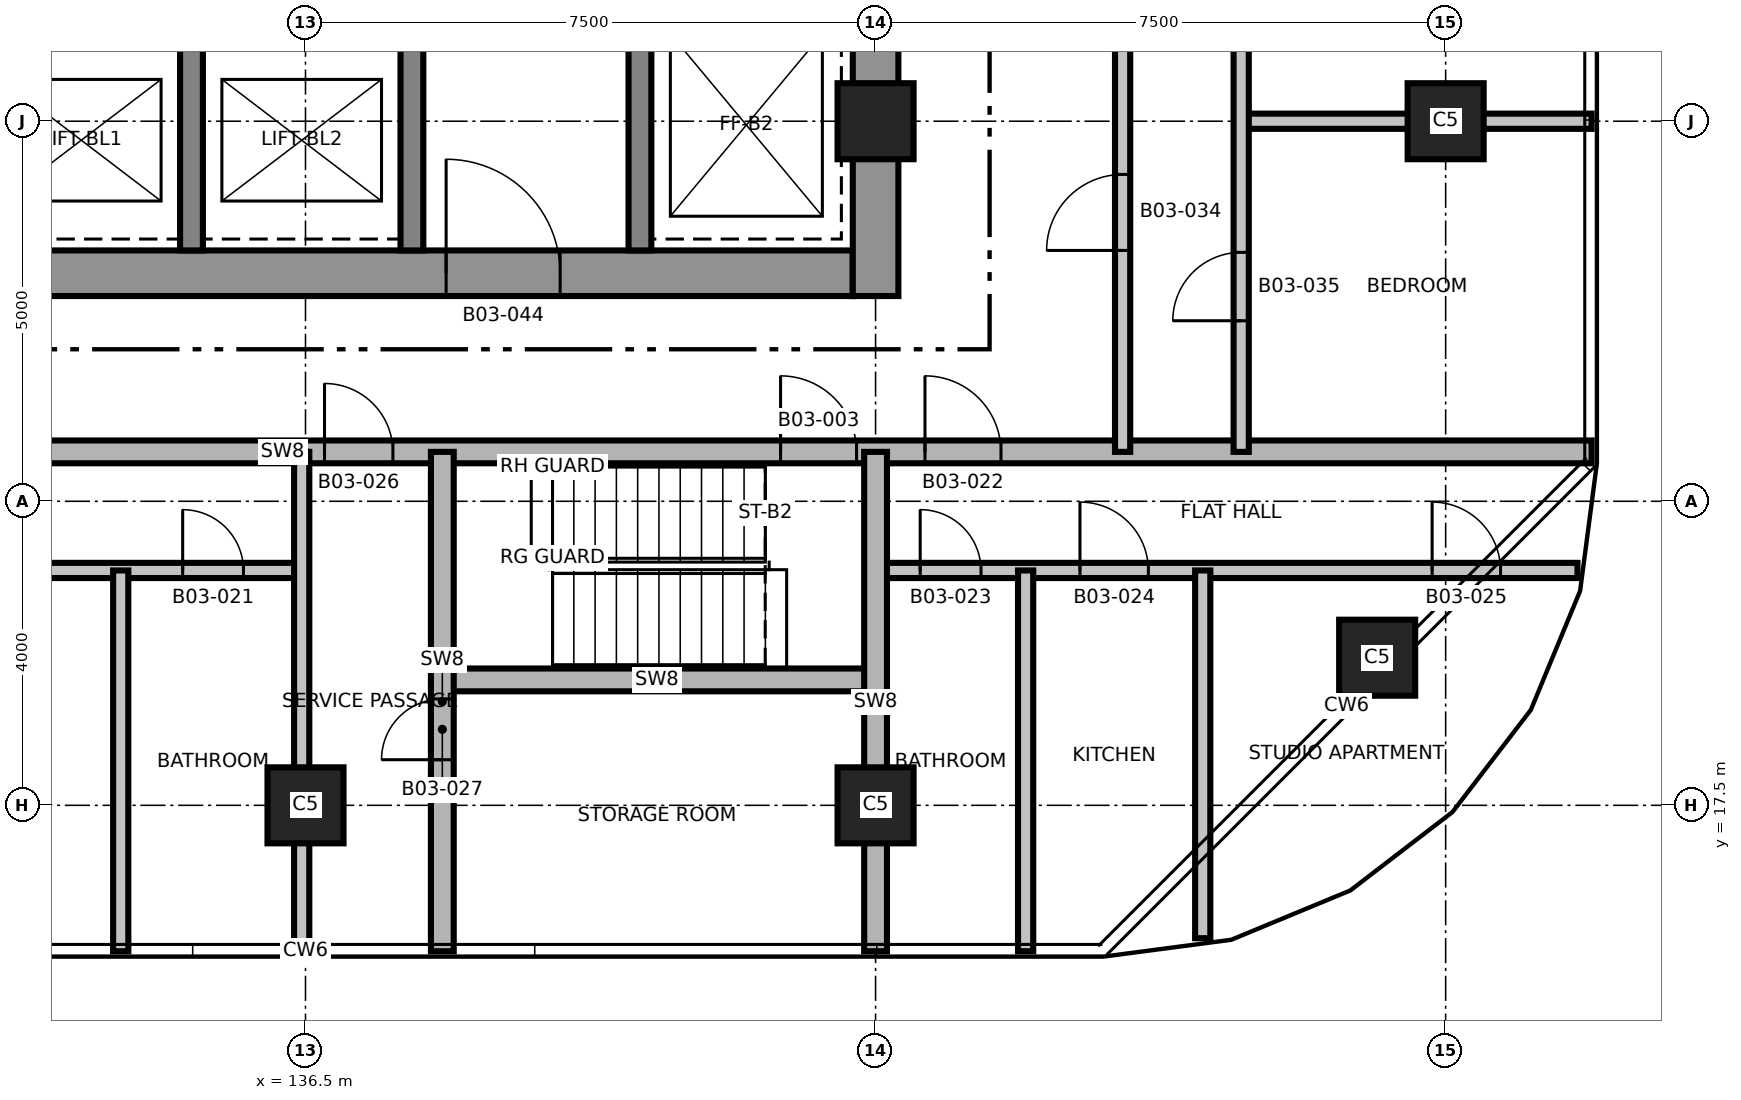
"""IFC4 building model, lengths in metres.
Left out: names, types, materials, properties, quantities, classifications, styles, units other than length and angle.
Written with IfcOpenShell. Run it as: python <this file> out.ifc"""

import sys

from ifc_helpers import new_model, si_unit, direction, frame, frame_2d, origin, origin_2d, place, context, subcontext, project, spatial, rectangle, extrude, element, fill, save


model = new_model("IFC4")
c1 = context("Model", 3, precision=1e-05, world=origin(), true_north=direction((0.0, 1.0)))
c2 = subcontext(c1, "Body", "Model", "MODEL_VIEW")
j1 = project(units=[si_unit("LENGTHUNIT", "METRE"), si_unit("PLANEANGLEUNIT", "RADIAN")], contexts=[c1])
p1 = place(None, origin())
s1 = spatial("IfcSite", under=j1, at=p1, CompositionType="ELEMENT")
p2 = place(p1, origin())
s2 = spatial("IfcBuilding", under=s1, at=p2, CompositionType="ELEMENT")
p3 = place(p2, frame((0.0, 0.0, 52.0)))
s3 = spatial("IfcBuildingStorey", under=s2, at=p3, CompositionType="ELEMENT", Elevation=52.0)
p4 = place(p3, frame((128.7, 24.5, 0.0), z_axis=(0.0, 0.0, 1.0), x_axis=(1.0, 0.0, 0.0)))
e1 = element("IfcWall", 1, at=p4, inside=s3, PredefinedType="SHEAR", context=c2, shape_type="SweptSolid", body=[
    extrude(rectangle(XDim=15.0, YDim=0.6, at=frame_2d((7.5, 0.0))), origin(), (0.0, 0.0, 1.0), 3.7),
])
p5 = place(p4, frame((9.65, 0.0, 0.0)))
e2 = element("IfcOpeningElement", 2, at=p5, cuts=e1, PredefinedType="OPENING", context=c2, shape_type="SweptSolid", body=[
    extrude(rectangle(XDim=1.5, YDim=2.1, at=frame_2d((0.75, 1.05))), frame((0.0, 0.31, 0.0), z_axis=(0.0, -1.0, 0.0), x_axis=(1.0, 0.0, 0.0)), (0.0, 0.0, 1.0), 0.62),
])
p6 = place(p4, frame((1.25, 0.0, 0.0)))
e3 = element("IfcOpeningElement", 3, at=p6, cuts=e1, PredefinedType="OPENING", context=c2, shape_type="SweptSolid", body=[
    extrude(rectangle(XDim=0.9, YDim=2.1, at=frame_2d((0.45, 1.05))), frame((0.0, 0.31, 0.0), z_axis=(0.0, -1.0, 0.0), x_axis=(1.0, 0.0, 0.0)), (0.0, 0.0, 1.0), 0.62),
])
p7 = place(p3, frame((144.0, 24.2, 0.0), z_axis=(0.0, 0.0, 1.0), x_axis=(0.0, 1.0, 0.0)))
e4 = element("IfcWall", 4, at=p7, inside=s3, PredefinedType="SHEAR", context=c2, shape_type="SweptSolid", body=[
    extrude(rectangle(XDim=13.6, YDim=0.6, at=frame_2d((6.8, 0.0))), origin(), (0.0, 0.0, 1.0), 3.7),
])
p8 = place(p3, frame((137.9, 24.8, 0.0), z_axis=(0.0, 0.0, 1.0), x_axis=(0.0, 1.0, 0.0)))
e5 = element("IfcWall", 5, at=p8, inside=s3, PredefinedType="SHEAR", context=c2, shape_type="SweptSolid", body=[
    extrude(rectangle(XDim=12.4, YDim=0.3, at=frame_2d((6.2, 0.0))), origin(), (0.0, 0.0, 1.0), 3.7),
])
p9 = place(p8, frame((3.95, 0.0, 0.0)))
e6 = element("IfcOpeningElement", 6, at=p9, cuts=e5, PredefinedType="OPENING", context=c2, shape_type="SweptSolid", body=[
    extrude(rectangle(XDim=1.5, YDim=2.1, at=frame_2d((0.75, 1.05))), frame((0.0, 0.16, 0.0), z_axis=(0.0, -1.0, 0.0), x_axis=(1.0, 0.0, 0.0)), (0.0, 0.0, 1.0), 0.32),
])
p10 = place(p8, frame((10.45, 0.0, 0.0)))
e7 = element("IfcOpeningElement", 7, at=p10, cuts=e5, PredefinedType="OPENING", context=c2, shape_type="SweptSolid", body=[
    extrude(rectangle(XDim=0.9, YDim=2.1, at=frame_2d((0.45, 1.05))), frame((0.0, 0.16, 0.0), z_axis=(0.0, -1.0, 0.0), x_axis=(1.0, 0.0, 0.0)), (0.0, 0.0, 1.0), 0.32),
])
p11 = place(p3, frame((140.9, 24.8, 0.0), z_axis=(0.0, 0.0, 1.0), x_axis=(0.0, 1.0, 0.0)))
e8 = element("IfcWall", 8, at=p11, inside=s3, PredefinedType="SHEAR", context=c2, shape_type="SweptSolid", body=[
    extrude(rectangle(XDim=12.4, YDim=0.3, at=frame_2d((6.2, 0.0))), origin(), (0.0, 0.0, 1.0), 3.7),
])
p12 = place(p11, frame((5.9, 0.0, 0.0)))
e9 = element("IfcOpeningElement", 9, at=p12, cuts=e8, PredefinedType="OPENING", context=c2, shape_type="SweptSolid", body=[
    extrude(rectangle(XDim=1.2, YDim=2.1, at=frame_2d((0.6, 1.05))), frame((0.0, 0.16, 0.0), z_axis=(0.0, -1.0, 0.0), x_axis=(1.0, 0.0, 0.0)), (0.0, 0.0, 1.0), 0.32),
])
p13 = place(p3, frame((135.0, 24.8, 0.0), z_axis=(0.0, 0.0, 1.0), x_axis=(0.0, 1.0, 0.0)))
e10 = element("IfcWall", 10, at=p13, inside=s3, PredefinedType="SHEAR", context=c2, shape_type="SweptSolid", body=[
    extrude(rectangle(XDim=2.75, YDim=0.3, at=frame_2d((1.375, 0.0))), origin(), (0.0, 0.0, 1.0), 3.7),
])
for number, where, z_axis, x_axis in (
    (11, (136.5, 17.5, 0.0), (0.0, 0.0, 1.0), (1.0, 0.0, 0.0)),
    (12, (144.0, 17.5, 0.0), (0.0, 0.0, 1.0), (1.0, 0.0, 0.0)),
    (13, (150.599, 19.442, 0.0), (0.0, 0.0, 1.0), (1.0, 0.0, 0.0)),
    (14, (144.0, 26.5, 0.0), (0.0, 0.0, 1.0), (1.0, 0.0, 0.0)),
    (15, (151.5, 26.5, 0.0), (0.0, 0.0, 1.0), (1.0, 0.0, 0.0)),
):
    element("IfcColumn", number, at=place(p3, frame(where, z_axis=z_axis, x_axis=x_axis)), inside=s3, PredefinedType="COLUMN", context=c2, shape_type="SweptSolid", body=[
        extrude(rectangle(XDim=1.0, YDim=1.0, at=origin_2d()), origin(), (0.0, 0.0, 1.0), 3.7),
    ])
p14 = place(p3, frame((138.25, 19.15, 0.0), z_axis=(0.0, 0.0, 1.0), x_axis=(1.0, 0.0, 0.0)))
e16 = element("IfcWall", 16, at=p14, inside=s3, PredefinedType="SHEAR", context=c2, shape_type="SweptSolid", body=[
    extrude(rectangle(XDim=5.75, YDim=0.3, at=frame_2d((2.875, 0.0))), origin(), (0.0, 0.0, 1.0), 3.4),
])
p15 = place(p3, frame((119.766, 20.59, 0.0), z_axis=(0.0, 0.0, 1.0), x_axis=(1.0, 0.0, 0.0)))
e17 = element("IfcWall", 17, at=p15, inside=s3, PredefinedType="PARTITIONING", context=c2, shape_type="SweptSolid", body=[
    extrude(rectangle(XDim=16.734, YDim=0.2, at=frame_2d((8.367, 0.0))), origin(), (0.0, 0.0, 1.0), 3.4),
])
p16 = place(p15, frame((3.282, 0.0, 0.0)))
e18 = element("IfcOpeningElement", 18, at=p16, cuts=e17, PredefinedType="OPENING", context=c2, shape_type="SweptSolid", body=[
    extrude(rectangle(XDim=0.9, YDim=2.1, at=frame_2d((0.45, 1.05))), frame((0.0, 0.11, 0.0), z_axis=(0.0, -1.0, 0.0), x_axis=(1.0, 0.0, 0.0)), (0.0, 0.0, 1.0), 0.22),
])
p17 = place(p15, frame((7.152, 0.0, 0.0)))
e19 = element("IfcOpeningElement", 19, at=p17, cuts=e17, PredefinedType="OPENING", context=c2, shape_type="SweptSolid", body=[
    extrude(rectangle(XDim=0.9, YDim=2.1, at=frame_2d((0.45, 1.05))), frame((0.0, 0.11, 0.0), z_axis=(0.0, -1.0, 0.0), x_axis=(1.0, 0.0, 0.0)), (0.0, 0.0, 1.0), 0.22),
])
p18 = place(p15, frame((11.318, 0.0, 0.0)))
e20 = element("IfcOpeningElement", 20, at=p18, cuts=e17, PredefinedType="OPENING", context=c2, shape_type="SweptSolid", body=[
    extrude(rectangle(XDim=0.9, YDim=2.1, at=frame_2d((0.45, 1.05))), frame((0.0, 0.11, 0.0), z_axis=(0.0, -1.0, 0.0), x_axis=(1.0, 0.0, 0.0)), (0.0, 0.0, 1.0), 0.22),
])
p19 = place(p15, frame((15.118, 0.0, 0.0)))
e21 = element("IfcOpeningElement", 21, at=p19, cuts=e17, PredefinedType="OPENING", context=c2, shape_type="SweptSolid", body=[
    extrude(rectangle(XDim=0.8, YDim=2.1, at=frame_2d((0.4, 1.05))), frame((0.0, 0.11, 0.0), z_axis=(0.0, -1.0, 0.0), x_axis=(1.0, 0.0, 0.0)), (0.0, 0.0, 1.0), 0.22),
])
p20 = place(p3, frame((144.0, 20.59, 0.0), z_axis=(0.0, 0.0, 1.0), x_axis=(1.0, 0.0, 0.0)))
e22 = element("IfcWall", 22, at=p20, inside=s3, PredefinedType="PARTITIONING", context=c2, shape_type="SweptSolid", body=[
    extrude(rectangle(XDim=9.234, YDim=0.2, at=frame_2d((4.617, 0.0))), origin(), (0.0, 0.0, 1.0), 3.4),
])
p21 = place(p20, frame((0.587, 0.0, 0.0)))
e23 = element("IfcOpeningElement", 23, at=p21, cuts=e22, PredefinedType="OPENING", context=c2, shape_type="SweptSolid", body=[
    extrude(rectangle(XDim=0.8, YDim=2.1, at=frame_2d((0.4, 1.05))), frame((0.0, 0.11, 0.0), z_axis=(0.0, -1.0, 0.0), x_axis=(1.0, 0.0, 0.0)), (0.0, 0.0, 1.0), 0.22),
])
p22 = place(p20, frame((2.689, 0.0, 0.0)))
e24 = element("IfcOpeningElement", 24, at=p22, cuts=e22, PredefinedType="OPENING", context=c2, shape_type="SweptSolid", body=[
    extrude(rectangle(XDim=0.9, YDim=2.1, at=frame_2d((0.45, 1.05))), frame((0.0, 0.11, 0.0), z_axis=(0.0, -1.0, 0.0), x_axis=(1.0, 0.0, 0.0)), (0.0, 0.0, 1.0), 0.22),
])
p23 = place(p20, frame((7.322, 0.0, 0.0)))
e25 = element("IfcOpeningElement", 25, at=p23, cuts=e22, PredefinedType="OPENING", context=c2, shape_type="SweptSolid", body=[
    extrude(rectangle(XDim=0.9, YDim=2.1, at=frame_2d((0.45, 1.05))), frame((0.0, 0.11, 0.0), z_axis=(0.0, -1.0, 0.0), x_axis=(1.0, 0.0, 0.0)), (0.0, 0.0, 1.0), 0.22),
])
p24 = place(p3, frame((119.58, 22.15, 0.0), z_axis=(0.0, 0.0, 1.0), x_axis=(1.0, 0.0, 0.0)))
e26 = element("IfcWall", 26, at=p24, inside=s3, PredefinedType="SHEAR", context=c2, shape_type="SweptSolid", body=[
    extrude(rectangle(XDim=33.84, YDim=0.3, at=frame_2d((16.92, 0.0))), origin(), (0.0, 0.0, 1.0), 3.4),
])
p25 = place(p24, frame((23.17, 0.0, 0.0)))
e27 = element("IfcOpeningElement", 27, at=p25, cuts=e26, PredefinedType="OPENING", context=c2, shape_type="SweptSolid", body=[
    extrude(rectangle(XDim=1.0, YDim=2.1, at=frame_2d((0.5, 1.05))), frame((0.0, 0.16, 0.0), z_axis=(0.0, -1.0, 0.0), x_axis=(1.0, 0.0, 0.0)), (0.0, 0.0, 1.0), 0.32),
])
p26 = place(p24, frame((11.52, 0.0, 0.0)))
e28 = element("IfcOpeningElement", 28, at=p26, cuts=e26, PredefinedType="OPENING", context=c2, shape_type="SweptSolid", body=[
    extrude(rectangle(XDim=1.0, YDim=2.1, at=frame_2d((0.5, 1.05))), frame((0.0, 0.16, 0.0), z_axis=(0.0, -1.0, 0.0), x_axis=(1.0, 0.0, 0.0)), (0.0, 0.0, 1.0), 0.32),
])
p27 = place(p24, frame((25.07, 0.0, 0.0)))
e29 = element("IfcOpeningElement", 29, at=p27, cuts=e26, PredefinedType="OPENING", context=c2, shape_type="SweptSolid", body=[
    extrude(rectangle(XDim=1.0, YDim=2.1, at=frame_2d((0.5, 1.05))), frame((0.0, 0.16, 0.0), z_axis=(0.0, -1.0, 0.0), x_axis=(1.0, 0.0, 0.0)), (0.0, 0.0, 1.0), 0.32),
])
p28 = place(p24, frame((17.17, 0.0, 0.0)))
e30 = element("IfcOpeningElement", 30, at=p28, cuts=e26, PredefinedType="OPENING", context=c2, shape_type="SweptSolid", body=[
    extrude(rectangle(XDim=0.9, YDim=2.1, at=frame_2d((0.45, 1.05))), frame((0.0, 0.16, 0.0), z_axis=(0.0, -1.0, 0.0), x_axis=(1.0, 0.0, 0.0)), (0.0, 0.0, 1.0), 0.32),
])
p29 = place(p3, frame((148.81, 26.5, 0.0), z_axis=(0.0, 0.0, 1.0), x_axis=(1.0, 0.0, 0.0)))
e31 = element("IfcWall", 31, at=p29, inside=s3, PredefinedType="PARTITIONING", context=c2, shape_type="SweptSolid", body=[
    extrude(rectangle(XDim=4.61, YDim=0.2, at=frame_2d((2.305, 0.0))), origin(), (0.0, 0.0, 1.0), 3.4),
])
p30 = place(p3, frame((134.069, 15.58, 0.0), z_axis=(0.0, 0.0, 1.0), x_axis=(0.0, 1.0, 0.0)))
e32 = element("IfcWall", 32, at=p30, inside=s3, PredefinedType="PARTITIONING", context=c2, shape_type="SweptSolid", body=[
    extrude(rectangle(XDim=5.01, YDim=0.2, at=frame_2d((2.505, 0.0))), origin(), (0.0, 0.0, 1.0), 3.4),
])
p31 = place(p3, frame((136.45, 15.58, 0.0), z_axis=(0.0, 0.0, 1.0), x_axis=(0.0, 1.0, 0.0)))
e33 = element("IfcWall", 33, at=p31, inside=s3, PredefinedType="PARTITIONING", context=c2, shape_type="SweptSolid", body=[
    extrude(rectangle(XDim=6.57, YDim=0.2, at=frame_2d((3.285, 0.0))), origin(), (0.0, 0.0, 1.0), 3.4),
])
p32 = place(p3, frame((138.3, 15.58, 0.0), z_axis=(0.0, 0.0, 1.0), x_axis=(0.0, 1.0, 0.0)))
e34 = element("IfcWall", 34, at=p32, inside=s3, PredefinedType="SHEAR", context=c2, shape_type="SweptSolid", body=[
    extrude(rectangle(XDim=6.57, YDim=0.3, at=frame_2d((3.285, 0.0))), origin(), (0.0, 0.0, 1.0), 3.4),
])
p33 = place(p32, frame((2.52, 0.0, 0.0)))
e35 = element("IfcOpeningElement", 35, at=p33, cuts=e34, PredefinedType="OPENING", context=c2, shape_type="SweptSolid", body=[
    extrude(rectangle(XDim=0.8, YDim=2.1, at=frame_2d((0.4, 1.05))), frame((0.0, 0.16, 0.0), z_axis=(0.0, -1.0, 0.0), x_axis=(1.0, 0.0, 0.0)), (0.0, 0.0, 1.0), 0.32),
])
p34 = place(p3, frame((144.0, 15.58, 0.0), z_axis=(0.0, 0.0, 1.0), x_axis=(0.0, 1.0, 0.0)))
e36 = element("IfcWall", 36, at=p34, inside=s3, PredefinedType="SHEAR", context=c2, shape_type="SweptSolid", body=[
    extrude(rectangle(XDim=6.57, YDim=0.3, at=frame_2d((3.285, 0.0))), origin(), (0.0, 0.0, 1.0), 3.4),
])
p35 = place(p3, frame((145.974, 15.58, 0.0), z_axis=(0.0, 0.0, 1.0), x_axis=(0.0, 1.0, 0.0)))
e37 = element("IfcWall", 37, at=p35, inside=s3, PredefinedType="PARTITIONING", context=c2, shape_type="SweptSolid", body=[
    extrude(rectangle(XDim=5.01, YDim=0.2, at=frame_2d((2.505, 0.0))), origin(), (0.0, 0.0, 1.0), 3.4),
])
p36 = place(p3, frame((147.25, 22.15, 0.0), z_axis=(0.0, 0.0, 1.0), x_axis=(0.0, 1.0, 0.0)))
e38 = element("IfcWall", 38, at=p36, inside=s3, PredefinedType="PARTITIONING", context=c2, shape_type="SweptSolid", body=[
    extrude(rectangle(XDim=17.7, YDim=0.2, at=frame_2d((8.85, 0.0))), origin(), (0.0, 0.0, 1.0), 3.4),
])
p37 = place(p36, frame((2.65, 0.0, 0.0)))
e39 = element("IfcOpeningElement", 39, at=p37, cuts=e38, PredefinedType="OPENING", context=c2, shape_type="SweptSolid", body=[
    extrude(rectangle(XDim=1.0, YDim=2.1, at=frame_2d((0.5, 1.05))), frame((0.0, 0.11, 0.0), z_axis=(0.0, -1.0, 0.0), x_axis=(1.0, 0.0, 0.0)), (0.0, 0.0, 1.0), 0.22),
])
p38 = place(p3, frame((148.304, 15.752, 0.0), z_axis=(0.0, 0.0, 1.0), x_axis=(0.0, 1.0, 0.0)))
e40 = element("IfcWall", 40, at=p38, inside=s3, PredefinedType="PARTITIONING", context=c2, shape_type="SweptSolid", body=[
    extrude(rectangle(XDim=4.838, YDim=0.2, at=frame_2d((2.419, 0.0))), origin(), (0.0, 0.0, 1.0), 3.4),
])
p39 = place(p3, frame((148.81, 22.15, 0.0), z_axis=(0.0, 0.0, 1.0), x_axis=(0.0, 1.0, 0.0)))
e41 = element("IfcWall", 41, at=p39, inside=s3, PredefinedType="PARTITIONING", context=c2, shape_type="SweptSolid", body=[
    extrude(rectangle(XDim=17.7, YDim=0.2, at=frame_2d((8.85, 0.0))), origin(), (0.0, 0.0, 1.0), 3.4),
])
p40 = place(p39, frame((1.725, 0.0, 0.0)))
e42 = element("IfcOpeningElement", 42, at=p40, cuts=e41, PredefinedType="OPENING", context=c2, shape_type="SweptSolid", body=[
    extrude(rectangle(XDim=0.9, YDim=2.1, at=frame_2d((0.45, 1.05))), frame((0.0, 0.11, 0.0), z_axis=(0.0, -1.0, 0.0), x_axis=(1.0, 0.0, 0.0)), (0.0, 0.0, 1.0), 0.22),
])
p41 = place(p39, frame((6.867, 0.0, 0.0)))
e43 = element("IfcOpeningElement", 43, at=p41, cuts=e41, PredefinedType="OPENING", context=c2, shape_type="SweptSolid", body=[
    extrude(rectangle(XDim=0.9, YDim=2.1, at=frame_2d((0.45, 1.05))), frame((0.0, 0.11, 0.0), z_axis=(0.0, -1.0, 0.0), x_axis=(1.0, 0.0, 0.0)), (0.0, 0.0, 1.0), 0.22),
])
p42 = place(p39, frame((11.367, 0.0, 0.0)))
e44 = element("IfcOpeningElement", 44, at=p42, cuts=e41, PredefinedType="OPENING", context=c2, shape_type="SweptSolid", body=[
    extrude(rectangle(XDim=0.9, YDim=2.1, at=frame_2d((0.45, 1.05))), frame((0.0, 0.11, 0.0), z_axis=(0.0, -1.0, 0.0), x_axis=(1.0, 0.0, 0.0)), (0.0, 0.0, 1.0), 0.22),
])
p43 = place(p39, frame((14.378, 0.0, 0.0)))
e45 = element("IfcOpeningElement", 45, at=p43, cuts=e41, PredefinedType="OPENING", context=c2, shape_type="SweptSolid", body=[
    extrude(rectangle(XDim=0.9, YDim=2.1, at=frame_2d((0.45, 1.05))), frame((0.0, 0.11, 0.0), z_axis=(0.0, -1.0, 0.0), x_axis=(1.0, 0.0, 0.0)), (0.0, 0.0, 1.0), 0.22),
])
p44 = place(p39, frame((16.603, 0.0, 0.0)))
e46 = element("IfcOpeningElement", 46, at=p44, cuts=e41, PredefinedType="OPENING", context=c2, shape_type="SweptSolid", body=[
    extrude(rectangle(XDim=0.8, YDim=2.1, at=frame_2d((0.4, 1.05))), frame((0.0, 0.11, 0.0), z_axis=(0.0, -1.0, 0.0), x_axis=(1.0, 0.0, 0.0)), (0.0, 0.0, 1.0), 0.22),
])
p45 = place(p25, origin())
e47 = element("IfcDoor", 47, at=p45, inside=s3, OperationType="SINGLE_SWING_LEFT", PredefinedType="DOOR", context=c2, shape_type="SweptSolid", body=[
    extrude(rectangle(XDim=1.0, YDim=2.1, at=frame_2d((0.5, 1.05))), frame((0.0, 0.025, 0.0), z_axis=(0.0, -1.0, 0.0), x_axis=(1.0, 0.0, 0.0)), (0.0, 0.0, 1.0), 0.05),
])
fill(e27, e47)
p46 = place(p19, origin())
e48 = element("IfcDoor", 48, at=p46, inside=s3, OperationType="SINGLE_SWING_LEFT", PredefinedType="DOOR", context=c2, shape_type="SweptSolid", body=[
    extrude(rectangle(XDim=0.8, YDim=2.1, at=frame_2d((0.4, 1.05))), frame((0.0, 0.025, 0.0), z_axis=(0.0, -1.0, 0.0), x_axis=(1.0, 0.0, 0.0)), (0.0, 0.0, 1.0), 0.05),
])
fill(e21, e48)
p47 = place(p27, origin())
e49 = element("IfcDoor", 49, at=p47, inside=s3, OperationType="SINGLE_SWING_RIGHT", PredefinedType="DOOR", context=c2, shape_type="SweptSolid", body=[
    extrude(rectangle(XDim=1.0, YDim=2.1, at=frame_2d((0.5, 1.05))), frame((0.0, 0.025, 0.0), z_axis=(0.0, -1.0, 0.0), x_axis=(1.0, 0.0, 0.0)), (0.0, 0.0, 1.0), 0.05),
])
fill(e29, e49)
p48 = place(p21, origin())
e50 = element("IfcDoor", 50, at=p48, inside=s3, OperationType="SINGLE_SWING_LEFT", PredefinedType="DOOR", context=c2, shape_type="SweptSolid", body=[
    extrude(rectangle(XDim=0.8, YDim=2.1, at=frame_2d((0.4, 1.05))), frame((0.0, 0.025, 0.0), z_axis=(0.0, -1.0, 0.0), x_axis=(1.0, 0.0, 0.0)), (0.0, 0.0, 1.0), 0.05),
])
fill(e23, e50)
p49 = place(p22, origin())
e51 = element("IfcDoor", 51, at=p49, inside=s3, OperationType="SINGLE_SWING_RIGHT", PredefinedType="DOOR", context=c2, shape_type="SweptSolid", body=[
    extrude(rectangle(XDim=0.9, YDim=2.1, at=frame_2d((0.45, 1.05))), frame((0.0, 0.025, 0.0), z_axis=(0.0, -1.0, 0.0), x_axis=(1.0, 0.0, 0.0)), (0.0, 0.0, 1.0), 0.05),
])
fill(e24, e51)
p50 = place(p23, origin())
e52 = element("IfcDoor", 52, at=p50, inside=s3, OperationType="SINGLE_SWING_LEFT", PredefinedType="DOOR", context=c2, shape_type="SweptSolid", body=[
    extrude(rectangle(XDim=0.9, YDim=2.1, at=frame_2d((0.45, 1.05))), frame((0.0, 0.025, 0.0), z_axis=(0.0, -1.0, 0.0), x_axis=(1.0, 0.0, 0.0)), (0.0, 0.0, 1.0), 0.05),
])
fill(e25, e52)
p51 = place(p28, origin())
e53 = element("IfcDoor", 53, at=p51, inside=s3, OperationType="SINGLE_SWING_RIGHT", PredefinedType="DOOR", context=c2, shape_type="SweptSolid", body=[
    extrude(rectangle(XDim=0.9, YDim=2.1, at=frame_2d((0.45, 1.05))), frame((0.0, 0.025, 0.0), z_axis=(0.0, -1.0, 0.0), x_axis=(1.0, 0.0, 0.0)), (0.0, 0.0, 1.0), 0.05),
])
fill(e30, e53)
p52 = place(p33, origin())
e54 = element("IfcDoor", 54, at=p52, inside=s3, OperationType="SINGLE_SWING_LEFT", PredefinedType="DOOR", context=c2, shape_type="SweptSolid", body=[
    extrude(rectangle(XDim=0.8, YDim=2.1, at=frame_2d((0.4, 1.05))), frame((0.0, 0.025, 0.0), z_axis=(0.0, -1.0, 0.0), x_axis=(1.0, 0.0, 0.0)), (0.0, 0.0, 1.0), 0.05),
])
fill(e35, e54)
p53 = place(p37, origin())
e55 = element("IfcDoor", 55, at=p53, inside=s3, OperationType="SINGLE_SWING_RIGHT", PredefinedType="DOOR", context=c2, shape_type="SweptSolid", body=[
    extrude(rectangle(XDim=1.0, YDim=2.1, at=frame_2d((0.5, 1.05))), frame((0.0, 0.025, 0.0), z_axis=(0.0, -1.0, 0.0), x_axis=(1.0, 0.0, 0.0)), (0.0, 0.0, 1.0), 0.05),
])
fill(e39, e55)
p54 = place(p40, origin())
e56 = element("IfcDoor", 56, at=p54, inside=s3, OperationType="SINGLE_SWING_LEFT", PredefinedType="DOOR", context=c2, shape_type="SweptSolid", body=[
    extrude(rectangle(XDim=0.9, YDim=2.1, at=frame_2d((0.45, 1.05))), frame((0.0, 0.025, 0.0), z_axis=(0.0, -1.0, 0.0), x_axis=(1.0, 0.0, 0.0)), (0.0, 0.0, 1.0), 0.05),
])
fill(e42, e56)
p55 = place(p5, origin())
e57 = element("IfcDoor", 57, at=p55, inside=s3, OperationType="SINGLE_SWING_LEFT", PredefinedType="DOOR", context=c2, shape_type="SweptSolid", body=[
    extrude(rectangle(XDim=1.5, YDim=2.1, at=frame_2d((0.75, 1.05))), frame((0.0, 0.025, 0.0), z_axis=(0.0, -1.0, 0.0), x_axis=(1.0, 0.0, 0.0)), (0.0, 0.0, 1.0), 0.05),
])
fill(e2, e57)
save(model, sys.argv[1])
